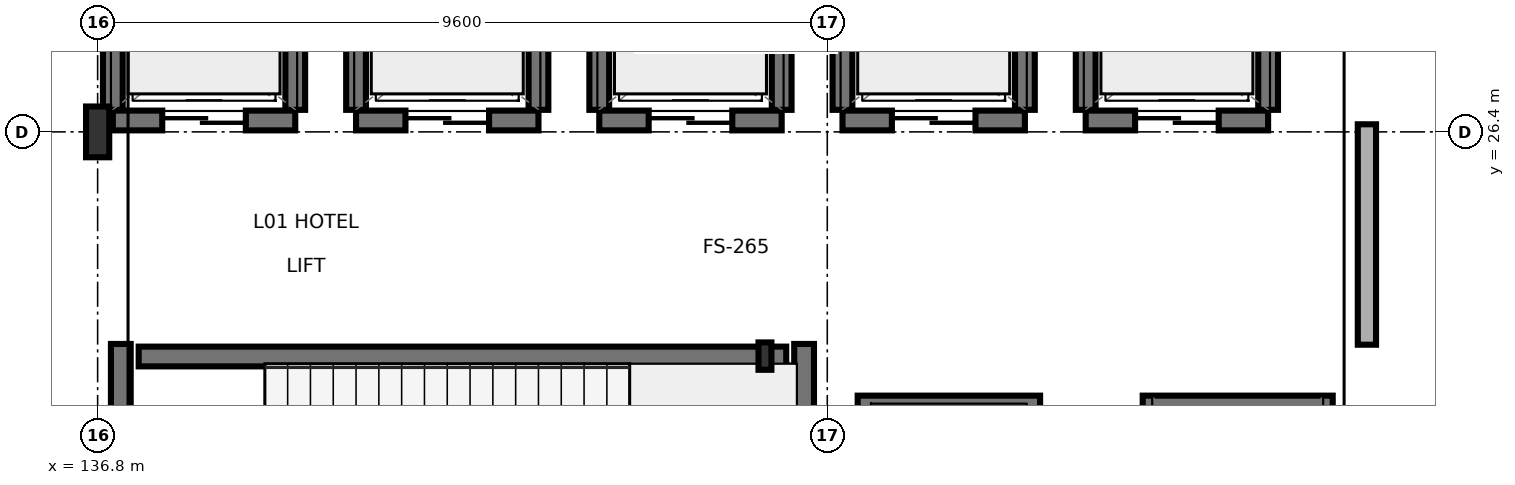
"""IFC4 building model, lengths in metres.
Left out: names, types, materials, properties, quantities, classifications, styles, units other than length and angle.
Written with IfcOpenShell. Run it as: python <this file> out.ifc"""

import sys

from ifc_helpers import new_model, si_unit, direction, frame, frame_2d, origin, origin_2d, place, context, subcontext, project, spatial, rectangle, i_section, extrude, element, fill, save


model = new_model("IFC4")
c1 = context("Model", 3, precision=1e-05, world=origin(), true_north=direction((0.0, 1.0)))
c2 = subcontext(c1, "Body", "Model", "MODEL_VIEW")
j1 = project(units=[si_unit("LENGTHUNIT", "METRE"), si_unit("PLANEANGLEUNIT", "RADIAN")], contexts=[c1])
p1 = place(None, origin())
s1 = spatial("IfcSite", under=j1, at=p1, CompositionType="ELEMENT")
p2 = place(p1, origin())
s2 = spatial("IfcBuilding", under=s1, at=p2, CompositionType="ELEMENT")
p3 = place(p2, origin())
s3 = spatial("IfcBuildingStorey", under=s2, at=p3, CompositionType="ELEMENT", Elevation=0.0)
p4 = place(p3, frame((136.8, 26.4, 0.0), z_axis=(0.0, 0.0, 1.0), x_axis=(1.0, 0.0, 0.0)))
e1 = element("IfcColumn", 1, at=p4, inside=s3, PredefinedType="COLUMN", context=c2, shape_type="SweptSolid", body=[
    extrude(i_section(OverallWidth=0.305, OverallDepth=0.668, WebThickness=0.021, FlangeThickness=0.04, FilletRadius=0.027, at=origin_2d()), origin(), (0.0, 0.0, 1.0), 5.4),
])
p5 = place(p3, frame((145.58, 23.45, 0.0), z_axis=(0.0, 0.0, 1.0), x_axis=(1.0, 0.0, 0.0)))
e2 = element("IfcColumn", 2, at=p5, inside=s3, PredefinedType="PILASTER", context=c2, shape_type="SweptSolid", body=[
    extrude(i_section(OverallWidth=0.17, OverallDepth=0.36, WebThickness=0.008, FlangeThickness=0.013, FilletRadius=0.018, at=origin_2d()), origin(), (0.0, 0.0, 1.0), 5.4),
])
p6 = place(p3, frame((137.105, 19.34, 0.0), z_axis=(0.0, 0.0, 1.0), x_axis=(0.0, 1.0, 0.0)))
e3 = element("IfcWall", 3, at=p6, inside=s3, PredefinedType="SHEAR", context=c2, shape_type="SweptSolid", body=[
    extrude(rectangle(XDim=4.27, YDim=0.26, at=frame_2d((2.135, 0.0))), origin(), (0.0, 0.0, 1.0), 5.14),
])
p7 = place(p6, frame((0.61, 0.0, 0.0)))
e4 = element("IfcOpeningElement", 4, at=p7, cuts=e3, PredefinedType="OPENING", context=c2, shape_type="SweptSolid", body=[
    extrude(rectangle(XDim=1.1, YDim=2.2, at=frame_2d((0.55, 1.1))), frame((0.0, 0.14, 0.0), z_axis=(0.0, -1.0, 0.0), x_axis=(1.0, 0.0, 0.0)), (0.0, 0.0, 1.0), 0.28),
])
p8 = place(p3, frame((146.095, 19.34, 0.0), z_axis=(0.0, 0.0, 1.0), x_axis=(0.0, 1.0, 0.0)))
e5 = element("IfcWall", 5, at=p8, inside=s3, PredefinedType="SHEAR", context=c2, shape_type="SweptSolid", body=[
    extrude(rectangle(XDim=4.27, YDim=0.26, at=frame_2d((2.135, 0.0))), origin(), (0.0, 0.0, 1.0), 5.14),
])
p9 = place(p3, frame((137.34, 23.445, 0.0), z_axis=(0.0, 0.0, 1.0), x_axis=(1.0, 0.0, 0.0)))
e6 = element("IfcWall", 6, at=p9, inside=s3, PredefinedType="SHEAR", context=c2, shape_type="SweptSolid", body=[
    extrude(rectangle(XDim=8.52, YDim=0.26, at=frame_2d((4.26, 0.0))), origin(), (0.0, 0.0, 1.0), 5.14),
])
p10 = place(p3, frame((137.0, 26.55, 0.0), z_axis=(0.0, 0.0, 1.0), x_axis=(1.0, 0.0, 0.0)))
e7 = element("IfcWall", 7, at=p10, inside=s3, PredefinedType="SHEAR", context=c2, shape_type="SweptSolid", body=[
    extrude(rectangle(XDim=2.4, YDim=0.26, at=frame_2d((1.2, 0.0))), origin(), (0.0, 0.0, 1.0), 4.625),
])
p11 = place(p10, frame((0.65, 0.0, 0.0)))
e8 = element("IfcOpeningElement", 8, at=p11, cuts=e7, PredefinedType="OPENING", context=c2, shape_type="SweptSolid", body=[
    extrude(rectangle(XDim=1.1, YDim=2.2, at=frame_2d((0.55, 1.1))), frame((0.0, 0.14, 0.0), z_axis=(0.0, -1.0, 0.0), x_axis=(1.0, 0.0, 0.0)), (0.0, 0.0, 1.0), 0.28),
])
for number, where, z_axis, x_axis in (
    (9, (137.0, 26.69, 0.0), (0.0, 0.0, 1.0), (0.0, 1.0, 0.0)),
    (10, (139.4, 26.69, 0.0), (0.0, 0.0, 1.0), (0.0, 1.0, 0.0)),
):
    element("IfcWall", number, at=place(p3, frame(where, z_axis=z_axis, x_axis=x_axis)), inside=s3, PredefinedType="SHEAR", context=c2, shape_type="SweptSolid", body=[
        extrude(rectangle(XDim=1.82, YDim=0.26, at=frame_2d((0.91, 0.0))), origin(), (0.0, 0.0, 1.0), 4.625),
    ])
p12 = place(p3, frame((140.2, 26.55, 0.0), z_axis=(0.0, 0.0, 1.0), x_axis=(1.0, 0.0, 0.0)))
e11 = element("IfcWall", 11, at=p12, inside=s3, PredefinedType="SHEAR", context=c2, shape_type="SweptSolid", body=[
    extrude(rectangle(XDim=2.4, YDim=0.26, at=frame_2d((1.2, 0.0))), origin(), (0.0, 0.0, 1.0), 5.14),
])
p13 = place(p12, frame((0.65, 0.0, 0.0)))
e12 = element("IfcOpeningElement", 12, at=p13, cuts=e11, PredefinedType="OPENING", context=c2, shape_type="SweptSolid", body=[
    extrude(rectangle(XDim=1.1, YDim=2.2, at=frame_2d((0.55, 1.1))), frame((0.0, 0.14, 0.0), z_axis=(0.0, -1.0, 0.0), x_axis=(1.0, 0.0, 0.0)), (0.0, 0.0, 1.0), 0.28),
])
for number, where, z_axis, x_axis in (
    (13, (140.2, 26.69, 0.0), (0.0, 0.0, 1.0), (0.0, 1.0, 0.0)),
    (14, (142.6, 26.69, 0.0), (0.0, 0.0, 1.0), (0.0, 1.0, 0.0)),
):
    element("IfcWall", number, at=place(p3, frame(where, z_axis=z_axis, x_axis=x_axis)), inside=s3, PredefinedType="SHEAR", context=c2, shape_type="SweptSolid", body=[
        extrude(rectangle(XDim=1.82, YDim=0.26, at=frame_2d((0.91, 0.0))), origin(), (0.0, 0.0, 1.0), 5.14),
    ])
p14 = place(p3, frame((143.4, 26.55, 0.0), z_axis=(0.0, 0.0, 1.0), x_axis=(1.0, 0.0, 0.0)))
e15 = element("IfcWall", 15, at=p14, inside=s3, PredefinedType="SHEAR", context=c2, shape_type="SweptSolid", body=[
    extrude(rectangle(XDim=2.4, YDim=0.26, at=frame_2d((1.2, 0.0))), origin(), (0.0, 0.0, 1.0), 5.14),
])
p15 = place(p14, frame((0.65, 0.0, 0.0)))
e16 = element("IfcOpeningElement", 16, at=p15, cuts=e15, PredefinedType="OPENING", context=c2, shape_type="SweptSolid", body=[
    extrude(rectangle(XDim=1.1, YDim=2.2, at=frame_2d((0.55, 1.1))), frame((0.0, 0.14, 0.0), z_axis=(0.0, -1.0, 0.0), x_axis=(1.0, 0.0, 0.0)), (0.0, 0.0, 1.0), 0.28),
])
for number, where, z_axis, x_axis in (
    (17, (143.4, 26.69, 0.0), (0.0, 0.0, 1.0), (0.0, 1.0, 0.0)),
    (18, (145.8, 26.69, 0.0), (0.0, 0.0, 1.0), (0.0, 1.0, 0.0)),
):
    element("IfcWall", number, at=place(p3, frame(where, z_axis=z_axis, x_axis=x_axis)), inside=s3, PredefinedType="SHEAR", context=c2, shape_type="SweptSolid", body=[
        extrude(rectangle(XDim=1.82, YDim=0.26, at=frame_2d((0.91, 0.0))), origin(), (0.0, 0.0, 1.0), 5.14),
    ])
p16 = place(p3, frame((146.6, 26.55, 0.0), z_axis=(0.0, 0.0, 1.0), x_axis=(1.0, 0.0, 0.0)))
e19 = element("IfcWall", 19, at=p16, inside=s3, PredefinedType="SHEAR", context=c2, shape_type="SweptSolid", body=[
    extrude(rectangle(XDim=2.4, YDim=0.26, at=frame_2d((1.2, 0.0))), origin(), (0.0, 0.0, 1.0), 5.14),
])
p17 = place(p16, frame((0.65, 0.0, 0.0)))
e20 = element("IfcOpeningElement", 20, at=p17, cuts=e19, PredefinedType="OPENING", context=c2, shape_type="SweptSolid", body=[
    extrude(rectangle(XDim=1.1, YDim=2.2, at=frame_2d((0.55, 1.1))), frame((0.0, 0.14, 0.0), z_axis=(0.0, -1.0, 0.0), x_axis=(1.0, 0.0, 0.0)), (0.0, 0.0, 1.0), 0.28),
])
for number, where, z_axis, x_axis in (
    (21, (146.6, 26.69, 0.0), (0.0, 0.0, 1.0), (0.0, 1.0, 0.0)),
    (22, (149.0, 26.69, 0.0), (0.0, 0.0, 1.0), (0.0, 1.0, 0.0)),
):
    element("IfcWall", number, at=place(p3, frame(where, z_axis=z_axis, x_axis=x_axis)), inside=s3, PredefinedType="SHEAR", context=c2, shape_type="SweptSolid", body=[
        extrude(rectangle(XDim=1.82, YDim=0.26, at=frame_2d((0.91, 0.0))), origin(), (0.0, 0.0, 1.0), 5.14),
    ])
p18 = place(p3, frame((149.8, 26.55, 0.0), z_axis=(0.0, 0.0, 1.0), x_axis=(1.0, 0.0, 0.0)))
e23 = element("IfcWall", 23, at=p18, inside=s3, PredefinedType="SHEAR", context=c2, shape_type="SweptSolid", body=[
    extrude(rectangle(XDim=2.4, YDim=0.26, at=frame_2d((1.2, 0.0))), origin(), (0.0, 0.0, 1.0), 5.14),
])
p19 = place(p18, frame((0.65, 0.0, 0.0)))
e24 = element("IfcOpeningElement", 24, at=p19, cuts=e23, PredefinedType="OPENING", context=c2, shape_type="SweptSolid", body=[
    extrude(rectangle(XDim=1.1, YDim=2.2, at=frame_2d((0.55, 1.1))), frame((0.0, 0.14, 0.0), z_axis=(0.0, -1.0, 0.0), x_axis=(1.0, 0.0, 0.0)), (0.0, 0.0, 1.0), 0.28),
])
for number, where, z_axis, x_axis in (
    (25, (149.8, 26.69, 0.0), (0.0, 0.0, 1.0), (0.0, 1.0, 0.0)),
    (26, (152.2, 26.69, 0.0), (0.0, 0.0, 1.0), (0.0, 1.0, 0.0)),
):
    element("IfcWall", number, at=place(p3, frame(where, z_axis=z_axis, x_axis=x_axis)), inside=s3, PredefinedType="SHEAR", context=c2, shape_type="SweptSolid", body=[
        extrude(rectangle(XDim=1.82, YDim=0.26, at=frame_2d((0.91, 0.0))), origin(), (0.0, 0.0, 1.0), 5.14),
    ])
p20 = place(p3, frame((146.8, 22.8, 0.0), z_axis=(0.0, 0.0, 1.0), x_axis=(1.0, 0.0, 0.0)))
e27 = element("IfcWall", 27, at=p20, inside=s3, PredefinedType="SHEAR", context=c2, shape_type="SweptSolid", body=[
    extrude(rectangle(XDim=2.4, YDim=0.26, at=frame_2d((1.2, 0.0))), origin(), (0.0, 0.0, 1.0), 5.14),
])
p21 = place(p3, frame((150.55, 22.8, 0.0), z_axis=(0.0, 0.0, 1.0), x_axis=(1.0, 0.0, 0.0)))
e28 = element("IfcWall", 28, at=p21, inside=s3, PredefinedType="SHEAR", context=c2, shape_type="SweptSolid", body=[
    extrude(rectangle(XDim=2.5, YDim=0.26, at=frame_2d((1.25, 0.0))), origin(), (0.0, 0.0, 1.0), 5.14),
])
p22 = place(p3, frame((153.5, 23.6, 0.0), z_axis=(0.0, 0.0, 1.0), x_axis=(0.0, 1.0, 0.0)))
e29 = element("IfcWall", 29, at=p22, inside=s3, PredefinedType="SOLIDWALL", context=c2, shape_type="SweptSolid", body=[
    extrude(rectangle(XDim=2.9, YDim=0.24, at=frame_2d((1.45, 0.0))), origin(), (0.0, 0.0, 1.0), 5.14),
])
p23 = place(p11, origin())
e30 = element("IfcDoor", 30, at=p23, inside=s3, OperationType="SLIDING_TO_LEFT", PredefinedType="DOOR", context=c2, shape_type="SweptSolid", body=[
    extrude(rectangle(XDim=1.1, YDim=2.2, at=frame_2d((0.55, 1.1))), frame((0.0, 0.025, 0.0), z_axis=(0.0, -1.0, 0.0), x_axis=(1.0, 0.0, 0.0)), (0.0, 0.0, 1.0), 0.05),
])
fill(e8, e30)
p24 = place(p13, origin())
e31 = element("IfcDoor", 31, at=p24, inside=s3, OperationType="SLIDING_TO_RIGHT", PredefinedType="DOOR", context=c2, shape_type="SweptSolid", body=[
    extrude(rectangle(XDim=1.1, YDim=2.2, at=frame_2d((0.55, 1.1))), frame((0.0, 0.025, 0.0), z_axis=(0.0, -1.0, 0.0), x_axis=(1.0, 0.0, 0.0)), (0.0, 0.0, 1.0), 0.05),
])
fill(e12, e31)
p25 = place(p15, origin())
e32 = element("IfcDoor", 32, at=p25, inside=s3, OperationType="SLIDING_TO_LEFT", PredefinedType="DOOR", context=c2, shape_type="SweptSolid", body=[
    extrude(rectangle(XDim=1.1, YDim=2.2, at=frame_2d((0.55, 1.1))), frame((0.0, 0.025, 0.0), z_axis=(0.0, -1.0, 0.0), x_axis=(1.0, 0.0, 0.0)), (0.0, 0.0, 1.0), 0.05),
])
fill(e16, e32)
p26 = place(p17, origin())
e33 = element("IfcDoor", 33, at=p26, inside=s3, OperationType="SLIDING_TO_RIGHT", PredefinedType="DOOR", context=c2, shape_type="SweptSolid", body=[
    extrude(rectangle(XDim=1.1, YDim=2.2, at=frame_2d((0.55, 1.1))), frame((0.0, 0.025, 0.0), z_axis=(0.0, -1.0, 0.0), x_axis=(1.0, 0.0, 0.0)), (0.0, 0.0, 1.0), 0.05),
])
fill(e20, e33)
p27 = place(p19, origin())
e34 = element("IfcDoor", 34, at=p27, inside=s3, OperationType="SLIDING_TO_LEFT", PredefinedType="DOOR", context=c2, shape_type="SweptSolid", body=[
    extrude(rectangle(XDim=1.1, YDim=2.2, at=frame_2d((0.55, 1.1))), frame((0.0, 0.025, 0.0), z_axis=(0.0, -1.0, 0.0), x_axis=(1.0, 0.0, 0.0)), (0.0, 0.0, 1.0), 0.05),
])
fill(e24, e34)
save(model, sys.argv[1])
